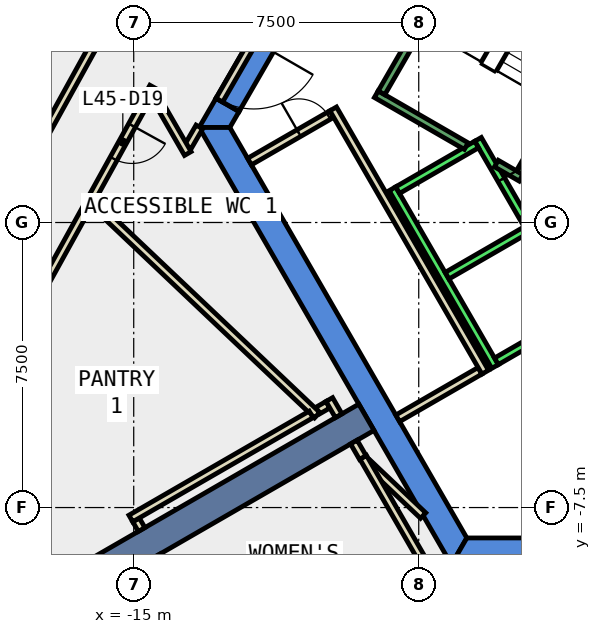
"""IFC4 building model, lengths in metres.
Left out: names, types, materials, properties, quantities, classifications, styles, units other than length and angle.
Written with IfcOpenShell. Run it as: python <this file> out.ifc"""

import sys

from ifc_helpers import new_model, si_unit, direction, frame, frame_2d, origin, place, context, subcontext, project, spatial, polyline, rectangle, outline, extrude, element, fill, save


model = new_model("IFC4")
c1 = context("Model", 3, precision=1e-05, world=origin(), true_north=direction((0.0, 1.0)))
c2 = subcontext(c1, "Body", "Model", "MODEL_VIEW")
j1 = project(units=[si_unit("LENGTHUNIT", "METRE"), si_unit("PLANEANGLEUNIT", "RADIAN")], contexts=[c1])
p1 = place(None, origin())
s1 = spatial("IfcSite", under=j1, at=p1, CompositionType="ELEMENT")
p2 = place(p1, origin())
s2 = spatial("IfcBuilding", under=s1, at=p2, CompositionType="ELEMENT")
p3 = place(p2, frame((0.0, 0.0, 202.4)))
s3 = spatial("IfcBuildingStorey", under=s2, at=p3, CompositionType="ELEMENT", Elevation=202.4)
p4 = place(p3, frame((0.0, 0.0, -0.4)))
e1 = element("IfcWall", 1, at=p4, inside=s3, PredefinedType="SHEAR", context=c2, shape_type="SweptSolid", body=[
    extrude(outline(polyline([(-12.228, 2.92), (-12.834, 3.27), (-13.279, 2.5), (-12.471, 2.5), (-12.228, 2.92)])), origin(), (0.0, 0.0, 1.0), 4.2),
])
p5 = place(p3, frame((0.0, 0.0, 3.6)))
e2 = element("IfcWall", 2, at=p5, inside=s3, PredefinedType="SHEAR", context=c2, shape_type="SweptSolid", body=[
    extrude(outline(polyline([(-12.834, 3.27), (-12.228, 2.92), (-11.228, 4.652), (-11.834, 5.002), (-12.834, 3.27)])), origin(), (0.0, 0.0, 1.0), 0.2),
])
p6 = place(p3, frame((0.0, 0.0, -0.4)))
e3 = element("IfcWall", 3, at=p6, inside=s3, PredefinedType="SHEAR", context=c2, shape_type="SweptSolid", body=[
    extrude(outline(polyline([(-13.279, 2.5), (-6.64, -9.0), (-6.235, -8.3), (-12.471, 2.5), (-13.279, 2.5)])), origin(), (0.0, 0.0, 1.0), 4.2),
])
p7 = place(p3, frame((0.0, 0.0, -0.4)))
e4 = element("IfcWall", 4, at=p7, inside=s3, PredefinedType="SHEAR", context=c2, shape_type="SweptSolid", body=[
    extrude(outline(polyline([(3.75, -9.0), (3.75, -8.3), (-6.235, -8.3), (-6.64, -9.0), (3.75, -9.0)])), origin(), (0.0, 0.0, 1.0), 4.2),
])
p8 = place(p3, frame((-8.877, -5.125, -0.4), z_axis=(0.0, 0.0, 1.0), x_axis=(-0.866017533419, -0.500013631625, 0.0)))
e5 = element("IfcWall", 5, at=p8, inside=s3, PredefinedType="SHEAR", context=c2, shape_type="SweptSolid", body=[
    extrude(rectangle(XDim=9.0, YDim=0.8, at=frame_2d((4.5, 0.0))), origin(), (0.0, 0.0, 1.0), 4.2),
])
p9 = place(p3, frame((-13.273, 2.514, 0.0), z_axis=(0.0, 0.0, 1.0), x_axis=(-0.50111559984, -0.865380353138, 0.0)))
e6 = element("IfcWall", 6, at=p9, inside=s3, PredefinedType="PARTITIONING", context=c2, shape_type="SweptSolid", body=[
    extrude(rectangle(XDim=0.606, YDim=0.2, at=frame_2d((0.303, 0.0))), origin(), (0.0, 0.0, 1.0), 3.8),
])
p10 = place(p3, frame((-13.577, 1.815, 0.0), z_axis=(0.0, 0.0, 1.0), x_axis=(-0.499951005625, 0.866053688852, 0.0)))
e7 = element("IfcWall", 7, at=p10, inside=s3, PredefinedType="PARTITIONING", context=c2, shape_type="SweptSolid", body=[
    extrude(rectangle(XDim=1.819, YDim=0.2, at=frame_2d((0.909, 0.0))), origin(), (0.0, 0.0, 1.0), 3.8),
])
p11 = place(p3, frame((-14.487, 3.564, 0.0), z_axis=(0.0, 0.0, 1.0), x_axis=(-0.483555199903, -0.875313868648, 0.0)))
e8 = element("IfcWall", 8, at=p11, inside=s3, PredefinedType="PARTITIONING", context=c2, shape_type="SweptSolid", body=[
    extrude(rectangle(XDim=3.309, YDim=0.2, at=frame_2d((1.654, 0.0))), origin(), (0.0, 0.0, 1.0), 3.8),
])
p12 = place(p11, frame((1.154, 0.0, 0.0)))
e9 = element("IfcOpeningElement", 9, at=p12, cuts=e8, PredefinedType="OPENING", context=c2, shape_type="SweptSolid", body=[
    extrude(rectangle(XDim=1.0, YDim=2.1, at=frame_2d((0.5, 1.05))), frame((0.0, 0.11, 0.0), z_axis=(0.0, -1.0, 0.0), x_axis=(1.0, 0.0, 0.0)), (0.0, 0.0, 1.0), 0.22),
])
p13 = place(p3, frame((-16.184, 0.493, 0.0), z_axis=(0.0, 0.0, 1.0), x_axis=(-0.48354397003, -0.875320072344, 0.0)))
e10 = element("IfcWall", 10, at=p13, inside=s3, PredefinedType="PARTITIONING", context=c2, shape_type="SweptSolid", body=[
    extrude(rectangle(XDim=4.467, YDim=0.2, at=frame_2d((2.233, 0.0))), origin(), (0.0, 0.0, 1.0), 3.8),
])
p14 = place(p3, frame((-18.015, 1.107, 0.0), z_axis=(0.0, 0.0, 1.0), x_axis=(0.483551557311, 0.875315880938, 0.0)))
e11 = element("IfcWall", 11, at=p14, inside=s3, PredefinedType="PARTITIONING", context=c2, shape_type="SweptSolid", body=[
    extrude(rectangle(XDim=3.987, YDim=0.2, at=frame_2d((1.994, 0.0))), origin(), (0.0, 0.0, 1.0), 3.8),
])
p15 = place(p3, frame((-5.888, -3.902, 0.0), z_axis=(0.0, 0.0, 1.0), x_axis=(-0.866022959057, -0.500004234368, 0.0)))
e12 = element("IfcWall", 12, at=p15, inside=s3, PredefinedType="PARTITIONING", context=c2, shape_type="SweptSolid", body=[
    extrude(rectangle(XDim=2.5, YDim=0.2, at=frame_2d((1.25, 0.0))), origin(), (0.0, 0.0, 1.0), 3.8),
])
p16 = place(p3, frame((-11.953, 1.603, 0.0), z_axis=(0.0, 0.0, 1.0), x_axis=(0.865998541277, 0.500046524342, 0.0)))
e13 = element("IfcWall", 13, at=p16, inside=s3, PredefinedType="PARTITIONING", context=c2, shape_type="SweptSolid", body=[
    extrude(rectangle(XDim=2.5, YDim=0.2, at=frame_2d((1.25, 0.0))), origin(), (0.0, 0.0, 1.0), 3.8),
])
p17 = place(p16, frame((1.5, 0.0, 0.0)))
e14 = element("IfcOpeningElement", 14, at=p17, cuts=e13, PredefinedType="OPENING", context=c2, shape_type="SweptSolid", body=[
    extrude(rectangle(XDim=0.9, YDim=2.1, at=frame_2d((0.45, 1.05))), frame((0.0, 0.11, 0.0), z_axis=(0.0, -1.0, 0.0), x_axis=(1.0, 0.0, 0.0)), (0.0, 0.0, 1.0), 0.22),
])
p18 = place(p3, frame((-9.751, 2.99, 0.0), z_axis=(0.0, 0.0, 1.0), x_axis=(0.500012163284, -0.866018381195, 0.0)))
e15 = element("IfcWall", 15, at=p18, inside=s3, PredefinedType="PARTITIONING", context=c2, shape_type="SweptSolid", body=[
    extrude(rectangle(XDim=8.0, YDim=0.2, at=frame_2d((4.0, 0.0))), origin(), (0.0, 0.0, 1.0), 3.8),
])
p19 = place(p3, frame((-8.84, -6.332, 0.0), z_axis=(0.0, 0.0, 1.0), x_axis=(0.726080635734, -0.687609562479, 0.0)))
e16 = element("IfcWall", 16, at=p19, inside=s3, PredefinedType="PARTITIONING", context=c2, shape_type="SweptSolid", body=[
    extrude(rectangle(XDim=2.005, YDim=0.2, at=frame_2d((1.003, 0.0))), origin(), (0.0, 0.0, 1.0), 3.8),
])
p20 = place(p3, frame((-7.283, -9.086, 0.0), z_axis=(0.0, 0.0, 1.0), x_axis=(-0.499883958536, 0.86609238999, 0.0)))
e17 = element("IfcWall", 17, at=p20, inside=s3, PredefinedType="PARTITIONING", context=c2, shape_type="SweptSolid", body=[
    extrude(rectangle(XDim=3.359, YDim=0.2, at=frame_2d((1.679, 0.0))), origin(), (0.0, 0.0, 1.0), 3.8),
])
p21 = place(p3, frame((-8.973, -6.183, 0.0), z_axis=(0.0, 0.0, 1.0), x_axis=(-0.499557093027, 0.86628096528, 0.0)))
e18 = element("IfcWall", 18, at=p21, inside=s3, PredefinedType="PARTITIONING", context=c2, shape_type="SweptSolid", body=[
    extrude(rectangle(XDim=0.469, YDim=0.2, at=frame_2d((0.234, 0.0))), origin(), (0.0, 0.0, 1.0), 3.8),
])
p22 = place(p3, frame((-9.89, -4.795, 0.0), z_axis=(0.0, 0.0, 1.0), x_axis=(-0.866447259568, -0.499268611457, 0.0)))
e19 = element("IfcWall", 19, at=p22, inside=s3, PredefinedType="PARTITIONING", context=c2, shape_type="SweptSolid", body=[
    extrude(rectangle(XDim=0.311, YDim=0.2, at=frame_2d((0.155, 0.0))), origin(), (0.0, 0.0, 1.0), 3.8),
])
p23 = place(p3, frame((-10.173, -5.069, 0.0), z_axis=(0.0, 0.0, 1.0), x_axis=(-0.725908697087, 0.687791075468, 0.0)))
e20 = element("IfcWall", 20, at=p23, inside=s3, PredefinedType="PARTITIONING", context=c2, shape_type="SweptSolid", body=[
    extrude(rectangle(XDim=8.313, YDim=0.2, at=frame_2d((4.157, 0.0))), origin(), (0.0, 0.0, 1.0), 3.8),
])
p24 = place(p3, frame((-14.792, -8.078, 0.0), z_axis=(0.0, 0.0, 1.0), x_axis=(-0.50241736454, 0.864625231999, 0.0)))
e21 = element("IfcWall", 21, at=p24, inside=s3, PredefinedType="PARTITIONING", context=c2, shape_type="SweptSolid", body=[
    extrude(rectangle(XDim=0.292, YDim=0.2, at=frame_2d((0.146, 0.0))), origin(), (0.0, 0.0, 1.0), 3.8),
])
p25 = place(p3, frame((-15.076, -7.788, 0.0), z_axis=(0.0, 0.0, 1.0), x_axis=(0.866092814325, 0.499883223337, 0.0)))
e22 = element("IfcWall", 22, at=p25, inside=s3, PredefinedType="PARTITIONING", context=c2, shape_type="SweptSolid", body=[
    extrude(rectangle(XDim=5.477, YDim=0.2, at=frame_2d((2.739, 0.0))), origin(), (0.0, 0.0, 1.0), 3.8),
])
p26 = place(p3, frame((-11.059, -14.545, 0.0), z_axis=(0.0, 0.0, 1.0), x_axis=(-0.499935899035, 0.866062409331, 0.0)))
e23 = element("IfcWall", 23, at=p26, inside=s3, PredefinedType="PARTITIONING", context=c2, shape_type="SweptSolid", body=[
    extrude(rectangle(XDim=6.667, YDim=0.2, at=frame_2d((3.333, 0.0))), origin(), (0.0, 0.0, 1.0), 3.8),
])
p27 = place(p3, frame((-11.747, 4.952, 0.0), z_axis=(0.0, 0.0, 1.0), x_axis=(-0.50002537861, -0.866010750942, 0.0)))
e24 = element("IfcWall", 24, at=p27, inside=s3, PredefinedType="PARTITIONING", context=c2, shape_type="SweptSolid", body=[
    extrude(rectangle(XDim=2.0, YDim=0.2, at=frame_2d((1.0, 0.0))), origin(), (0.0, 0.0, 1.0), 2.4),
])
p28 = place(p27, frame((0.19, 0.0, 0.0)))
e25 = element("IfcOpeningElement", 25, at=p28, cuts=e24, PredefinedType="OPENING", context=c2, shape_type="SweptSolid", body=[
    extrude(rectangle(XDim=1.8, YDim=2.1, at=frame_2d((0.9, 1.05))), frame((0.0, 0.11, 0.0), z_axis=(0.0, -1.0, 0.0), x_axis=(1.0, 0.0, 0.0)), (0.0, 0.0, 1.0), 0.22),
])
p29 = place(p3, frame((-9.607, -5.084, 0.0), z_axis=(0.0, 0.0, 1.0), x_axis=(-0.500194922027, 0.865912836248, 0.0)))
e26 = element("IfcWall", 26, at=p29, inside=s3, PredefinedType="PARTITIONING", context=c2, shape_type="SweptSolid", body=[
    extrude(rectangle(XDim=0.492, YDim=0.2, at=frame_2d((0.246, 0.0))), origin(), (0.0, 0.0, 1.0), 3.8),
])
p30 = place(p3, frame((-5.94, 2.188, 0.0), z_axis=(0.0, 0.0, 1.0), x_axis=(0.500034260056, -0.866005622828, 0.0)))
e27 = element("IfcWall", 27, at=p30, inside=s3, PredefinedType="STANDARD", context=c2, shape_type="SweptSolid", body=[
    extrude(rectangle(XDim=5.399, YDim=0.2, at=frame_2d((2.7, 0.0))), origin(), (0.0, 0.0, 1.0), 3.8),
])
p31 = place(p30, frame((3.075, 0.0, 0.0)))
e28 = element("IfcOpeningElement", 28, at=p31, cuts=e27, PredefinedType="OPENING", context=c2, shape_type="SweptSolid", body=[
    extrude(rectangle(XDim=1.1, YDim=2.1, at=frame_2d((0.55, 1.05))), frame((0.0, 0.11, 0.0), z_axis=(0.0, -1.0, 0.0), x_axis=(1.0, 0.0, 0.0)), (0.0, 0.0, 1.0), 0.22),
])
p32 = place(p30, frame((1.225, 0.0, 0.0)))
e29 = element("IfcOpeningElement", 29, at=p32, cuts=e27, PredefinedType="OPENING", context=c2, shape_type="SweptSolid", body=[
    extrude(rectangle(XDim=1.1, YDim=2.1, at=frame_2d((0.55, 1.05))), frame((0.0, 0.11, 0.0), z_axis=(0.0, -1.0, 0.0), x_axis=(1.0, 0.0, 0.0)), (0.0, 0.0, 1.0), 0.22),
])
p33 = place(p3, frame((-8.192, 0.888, 0.0), z_axis=(0.0, 0.0, 1.0), x_axis=(0.500034260056, -0.866005622828, 0.0)))
e30 = element("IfcWall", 30, at=p33, inside=s3, PredefinedType="STANDARD", context=c2, shape_type="SweptSolid", body=[
    extrude(rectangle(XDim=5.399, YDim=0.2, at=frame_2d((2.7, 0.0))), origin(), (0.0, 0.0, 1.0), 3.8),
])
for number, where, z_axis, x_axis in (
    (31, (-5.977, 2.052, 0.0), (0.0, 0.0, 1.0), (-0.866, -0.5, 0.0)),
    (32, (-4.677, -0.2, 0.0), (0.0, 0.0, 1.0), (-0.866, -0.5, 0.0)),
):
    element("IfcWall", number, at=place(p3, frame(where, z_axis=z_axis, x_axis=x_axis)), inside=s3, PredefinedType="STANDARD", context=c2, shape_type="SweptSolid", body=[
        extrude(rectangle(XDim=2.399, YDim=0.2, at=frame_2d((1.2, 0.0))), origin(), (0.0, 0.0, 1.0), 3.8),
    ])
p34 = place(p3, frame((-3.377, -2.452, 0.0), z_axis=(0.0, 0.0, 1.0), x_axis=(-0.865955154139, -0.50012165622, 0.0)))
e33 = element("IfcWall", 33, at=p34, inside=s3, PredefinedType="STANDARD", context=c2, shape_type="SweptSolid", body=[
    extrude(rectangle(XDim=2.4, YDim=0.2, at=frame_2d((1.2, 0.0))), origin(), (0.0, 0.0, 1.0), 3.8),
])
p35 = place(p3, frame((-6.25, 2.01, 0.0), z_axis=(0.0, 0.0, 1.0), x_axis=(-0.86611865017, 0.499838457731, 0.0)))
e34 = element("IfcWall", 34, at=p35, inside=s3, PredefinedType="STANDARD", context=c2, shape_type="SweptSolid", body=[
    extrude(rectangle(XDim=2.733, YDim=0.2, at=frame_2d((1.366, 0.0))), origin(), (0.0, 0.0, 1.0), 3.8),
])
p36 = place(p3, frame((-4.806, 1.176, 0.0), z_axis=(0.0, 0.0, 1.0), x_axis=(-0.866558586415, 0.499075361355, 0.0)))
e35 = element("IfcWall", 35, at=p36, inside=s3, PredefinedType="STANDARD", context=c2, shape_type="SweptSolid", body=[
    extrude(rectangle(XDim=0.751, YDim=0.2, at=frame_2d((0.376, 0.0))), origin(), (0.0, 0.0, 1.0), 3.8),
])
p37 = place(p3, frame((-1.393, 7.288, 0.0), z_axis=(0.0, 0.0, 1.0), x_axis=(-0.499963383562, -0.866046543262, 0.0)))
e36 = element("IfcWall", 36, at=p37, inside=s3, PredefinedType="STANDARD", context=c2, shape_type="SweptSolid", body=[
    extrude(rectangle(XDim=6.9, YDim=0.2, at=frame_2d((3.45, 0.0))), origin(), (0.0, 0.0, 1.0), 3.8),
])
p38 = place(p37, frame((0.45, 0.0, 0.0)))
e37 = element("IfcOpeningElement", 37, at=p38, cuts=e36, PredefinedType="OPENING", context=c2, shape_type="SweptSolid", body=[
    extrude(rectangle(XDim=1.1, YDim=2.2, at=frame_2d((0.55, 1.1))), frame((0.0, 0.11, 0.0), z_axis=(0.0, -1.0, 0.0), x_axis=(1.0, 0.0, 0.0)), (0.0, 0.0, 1.0), 0.22),
])
p39 = place(p3, frame((-5.03, 9.388, 0.0), z_axis=(0.0, 0.0, 1.0), x_axis=(-0.499978703459, -0.866037698999, 0.0)))
e38 = element("IfcWall", 38, at=p39, inside=s3, PredefinedType="STANDARD", context=c2, shape_type="SweptSolid", body=[
    extrude(rectangle(XDim=6.9, YDim=0.2, at=frame_2d((3.45, 0.0))), origin(), (0.0, 0.0, 1.0), 3.8),
])
p40 = place(p12, origin())
e39 = element("IfcDoor", 39, at=p40, inside=s3, OperationType="SINGLE_SWING_LEFT", PredefinedType="DOOR", context=c2, shape_type="SweptSolid", body=[
    extrude(rectangle(XDim=1.0, YDim=2.1, at=frame_2d((0.5, 1.05))), frame((0.0, 0.025, 0.0), z_axis=(0.0, -1.0, 0.0), x_axis=(1.0, 0.0, 0.0)), (0.0, 0.0, 1.0), 0.05),
])
fill(e9, e39)
p41 = place(p17, origin())
e40 = element("IfcDoor", 40, at=p41, inside=s3, OperationType="SINGLE_SWING_LEFT", PredefinedType="DOOR", context=c2, shape_type="SweptSolid", body=[
    extrude(rectangle(XDim=0.9, YDim=2.1, at=frame_2d((0.45, 1.05))), frame((0.0, 0.025, 0.0), z_axis=(0.0, -1.0, 0.0), x_axis=(1.0, 0.0, 0.0)), (0.0, 0.0, 1.0), 0.05),
])
fill(e14, e40)
p42 = place(p28, origin())
e41 = element("IfcDoor", 41, at=p42, inside=s3, OperationType="DOUBLE_DOOR_SINGLE_SWING", PredefinedType="DOOR", context=c2, shape_type="SweptSolid", body=[
    extrude(rectangle(XDim=1.8, YDim=2.1, at=frame_2d((0.9, 1.05))), frame((0.0, 0.025, 0.0), z_axis=(0.0, -1.0, 0.0), x_axis=(1.0, 0.0, 0.0)), (0.0, 0.0, 1.0), 0.05),
])
fill(e25, e41)
p43 = place(p32, origin())
e42 = element("IfcDoor", 42, at=p43, inside=s3, OperationType="SLIDING_TO_LEFT", PredefinedType="DOOR", context=c2, shape_type="SweptSolid", body=[
    extrude(rectangle(XDim=1.1, YDim=2.1, at=frame_2d((0.55, 1.05))), frame((0.0, 0.025, 0.0), z_axis=(0.0, -1.0, 0.0), x_axis=(1.0, 0.0, 0.0)), (0.0, 0.0, 1.0), 0.05),
])
fill(e29, e42)
save(model, sys.argv[1])
